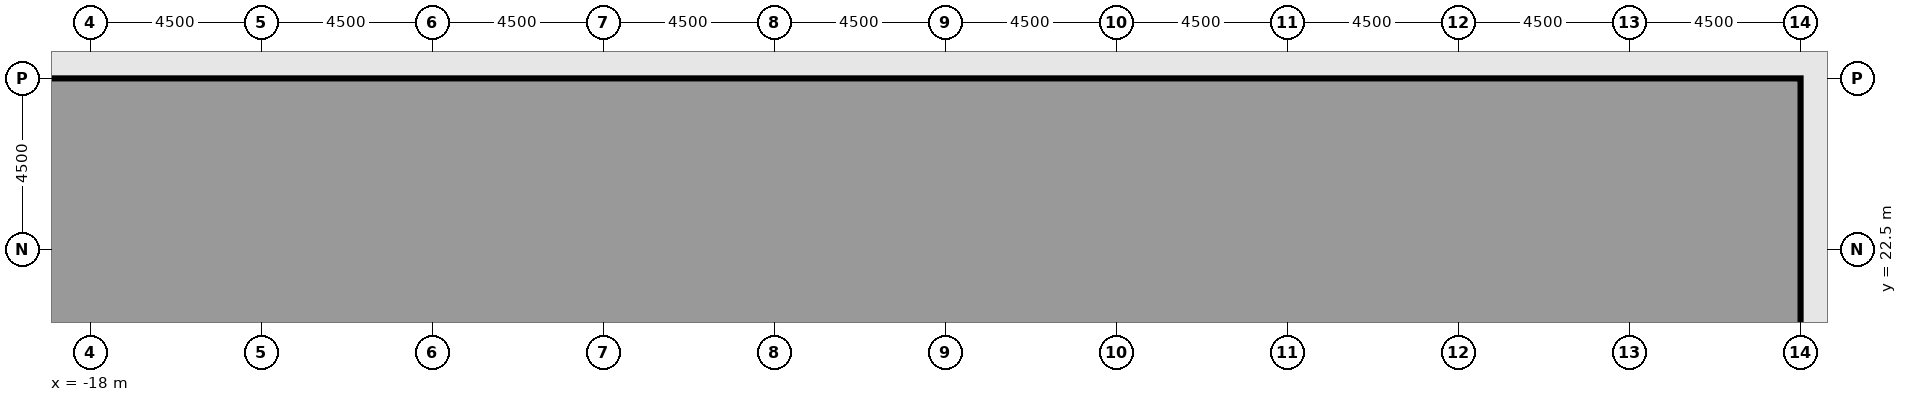
"""IFC4 building model, lengths in metres.
Left out: names, types, materials, properties, quantities, classifications, styles, units other than length and angle.
Written with IfcOpenShell. Run it as: python <this file> out.ifc"""

import sys

from ifc_helpers import new_model, si_unit, direction, frame, frame_2d, origin, origin_2d, place, context, subcontext, project, spatial, rectangle, extrude, element, fill, save


model = new_model("IFC4")
c1 = context("Model", 3, precision=1e-05, world=origin(), true_north=direction((0.0, 1.0)))
c2 = subcontext(c1, "Body", "Model", "MODEL_VIEW")
j1 = project(units=[si_unit("LENGTHUNIT", "METRE"), si_unit("PLANEANGLEUNIT", "RADIAN")], contexts=[c1])
p1 = place(None, origin())
s1 = spatial("IfcSite", under=j1, at=p1, CompositionType="ELEMENT")
p2 = place(p1, origin())
s2 = spatial("IfcBuilding", under=s1, at=p2, CompositionType="ELEMENT")
p3 = place(p2, frame((0.0, 0.0, 7.2)))
s3 = spatial("IfcBuildingStorey", under=s2, at=p3, CompositionType="ELEMENT", Elevation=7.2)
for number, where, z_axis, x_axis in (
    (1, (-18.0, 27.0, -0.45), (0.0, 0.0, 1.0), (1.0, 0.0, 0.0)),
    (2, (-13.5, 27.0, -0.45), (0.0, 0.0, 1.0), (1.0, 0.0, 0.0)),
    (3, (-9.0, 27.0, -0.45), (0.0, 0.0, 1.0), (1.0, 0.0, 0.0)),
    (4, (-4.5, 27.0, -0.45), (0.0, 0.0, 1.0), (1.0, 0.0, 0.0)),
    (5, (0.0, 27.0, -0.45), (0.0, 0.0, 1.0), (1.0, 0.0, 0.0)),
    (6, (4.5, 27.0, -0.45), (0.0, 0.0, 1.0), (1.0, 0.0, 0.0)),
    (7, (9.0, 27.0, -0.45), (0.0, 0.0, 1.0), (1.0, 0.0, 0.0)),
    (8, (13.5, 27.0, -0.45), (0.0, 0.0, 1.0), (1.0, 0.0, 0.0)),
    (9, (18.0, 27.0, -0.45), (0.0, 0.0, 1.0), (1.0, 0.0, 0.0)),
    (10, (22.5, 27.0, -0.45), (0.0, 0.0, 1.0), (1.0, 0.0, 0.0)),
    (11, (27.0, 22.5, -0.45), (0.0, 0.0, 1.0), (1.0, 0.0, 0.0)),
):
    element("IfcColumn", number, at=place(p3, frame(where, z_axis=z_axis, x_axis=x_axis)), inside=s3, PredefinedType="COLUMN", context=c2, shape_type="SweptSolid", body=[
        extrude(rectangle(XDim=1.4, YDim=1.4, at=origin_2d()), origin(), (0.0, 0.0, 1.0), 4.55),
    ])
for number, where, z_axis, x_axis in (
    (12, (-18.0, 22.5, 0.0), (0.0, 0.0, 1.0), (1.0, 0.0, 0.0)),
    (13, (-9.0, 22.5, 0.0), (0.0, 0.0, 1.0), (1.0, 0.0, 0.0)),
    (14, (0.0, 22.5, 0.0), (0.0, 0.0, 1.0), (1.0, 0.0, 0.0)),
    (15, (9.0, 22.5, 0.0), (0.0, 0.0, 1.0), (1.0, 0.0, 0.0)),
    (16, (18.0, 22.5, 0.0), (0.0, 0.0, 1.0), (1.0, 0.0, 0.0)),
):
    element("IfcColumn", number, at=place(p3, frame(where, z_axis=z_axis, x_axis=x_axis)), inside=s3, PredefinedType="COLUMN", context=c2, shape_type="SweptSolid", body=[
        extrude(rectangle(XDim=1.6, YDim=1.6, at=origin_2d()), origin(), (0.0, 0.0, 1.0), 4.1),
    ])
p4 = place(p3, frame((27.0, 21.8, 0.0), z_axis=(0.0, 0.0, 1.0), x_axis=(0.0, -1.0, 0.0)))
e17 = element("IfcWall", 17, at=p4, inside=s3, PredefinedType="SOLIDWALL", context=c2, shape_type="SweptSolid", body=[
    extrude(rectangle(XDim=3.1, YDim=0.3, at=frame_2d((1.55, 0.0))), origin(), (0.0, 0.0, 1.0), 2.75),
])
p5 = place(p4, frame((0.575, 0.0, 0.8)))
e18 = element("IfcOpeningElement", 18, at=p5, cuts=e17, PredefinedType="OPENING", context=c2, shape_type="SweptSolid", body=[
    extrude(rectangle(XDim=2.4, YDim=1.7, at=frame_2d((1.2, 0.85))), frame((0.0, 0.16, 0.0), z_axis=(0.0, -1.0, 0.0), x_axis=(1.0, 0.0, 0.0)), (0.0, 0.0, 1.0), 0.32),
])
p6 = place(p3, frame((23.094, 26.406, 0.0), z_axis=(0.0, 0.0, 1.0), x_axis=(0.707106781187, -0.707106781187, 0.0)))
e19 = element("IfcWall", 19, at=p6, inside=s3, PredefinedType="SOLIDWALL", context=c2, shape_type="SweptSolid", body=[
    extrude(rectangle(XDim=4.684, YDim=0.3, at=frame_2d((2.342, 0.0))), origin(), (0.0, 0.0, 1.0), 2.75),
])
p7 = place(p6, frame((1.142, 0.0, 0.8)))
e20 = element("IfcOpeningElement", 20, at=p7, cuts=e19, PredefinedType="OPENING", context=c2, shape_type="SweptSolid", body=[
    extrude(rectangle(XDim=2.4, YDim=1.7, at=frame_2d((1.2, 0.85))), frame((0.0, 0.16, 0.0), z_axis=(0.0, -1.0, 0.0), x_axis=(1.0, 0.0, 0.0)), (0.0, 0.0, 1.0), 0.32),
])
p8 = place(p3, frame((18.7, 27.0, 0.0), z_axis=(0.0, 0.0, 1.0), x_axis=(1.0, 0.0, 0.0)))
e21 = element("IfcWall", 21, at=p8, inside=s3, PredefinedType="SOLIDWALL", context=c2, shape_type="SweptSolid", body=[
    extrude(rectangle(XDim=3.1, YDim=0.3, at=frame_2d((1.55, 0.0))), origin(), (0.0, 0.0, 1.0), 2.75),
])
p9 = place(p8, frame((0.35, 0.0, 0.8)))
e22 = element("IfcOpeningElement", 22, at=p9, cuts=e21, PredefinedType="OPENING", context=c2, shape_type="SweptSolid", body=[
    extrude(rectangle(XDim=2.4, YDim=1.7, at=frame_2d((1.2, 0.85))), frame((0.0, 0.16, 0.0), z_axis=(0.0, -1.0, 0.0), x_axis=(1.0, 0.0, 0.0)), (0.0, 0.0, 1.0), 0.32),
])
p10 = place(p3, frame((14.2, 27.0, 0.0), z_axis=(0.0, 0.0, 1.0), x_axis=(1.0, 0.0, 0.0)))
e23 = element("IfcWall", 23, at=p10, inside=s3, PredefinedType="SOLIDWALL", context=c2, shape_type="SweptSolid", body=[
    extrude(rectangle(XDim=3.1, YDim=0.3, at=frame_2d((1.55, 0.0))), origin(), (0.0, 0.0, 1.0), 2.75),
])
p11 = place(p10, frame((1.05, 0.0, 0.0)))
e24 = element("IfcOpeningElement", 24, at=p11, cuts=e23, PredefinedType="OPENING", context=c2, shape_type="SweptSolid", body=[
    extrude(rectangle(XDim=1.0, YDim=2.2, at=frame_2d((0.5, 1.1))), frame((0.0, 0.16, 0.0), z_axis=(0.0, -1.0, 0.0), x_axis=(1.0, 0.0, 0.0)), (0.0, 0.0, 1.0), 0.32),
])
p12 = place(p3, frame((9.7, 27.0, 0.0), z_axis=(0.0, 0.0, 1.0), x_axis=(1.0, 0.0, 0.0)))
e25 = element("IfcWall", 25, at=p12, inside=s3, PredefinedType="SOLIDWALL", context=c2, shape_type="SweptSolid", body=[
    extrude(rectangle(XDim=3.1, YDim=0.3, at=frame_2d((1.55, 0.0))), origin(), (0.0, 0.0, 1.0), 2.75),
])
p13 = place(p12, frame((0.35, 0.0, 0.8)))
e26 = element("IfcOpeningElement", 26, at=p13, cuts=e25, PredefinedType="OPENING", context=c2, shape_type="SweptSolid", body=[
    extrude(rectangle(XDim=2.4, YDim=1.7, at=frame_2d((1.2, 0.85))), frame((0.0, 0.16, 0.0), z_axis=(0.0, -1.0, 0.0), x_axis=(1.0, 0.0, 0.0)), (0.0, 0.0, 1.0), 0.32),
])
p14 = place(p3, frame((5.2, 27.0, 0.0), z_axis=(0.0, 0.0, 1.0), x_axis=(1.0, 0.0, 0.0)))
e27 = element("IfcWall", 27, at=p14, inside=s3, PredefinedType="SOLIDWALL", context=c2, shape_type="SweptSolid", body=[
    extrude(rectangle(XDim=3.1, YDim=0.3, at=frame_2d((1.55, 0.0))), origin(), (0.0, 0.0, 1.0), 2.75),
])
p15 = place(p14, frame((0.35, 0.0, 0.8)))
e28 = element("IfcOpeningElement", 28, at=p15, cuts=e27, PredefinedType="OPENING", context=c2, shape_type="SweptSolid", body=[
    extrude(rectangle(XDim=2.4, YDim=1.7, at=frame_2d((1.2, 0.85))), frame((0.0, 0.16, 0.0), z_axis=(0.0, -1.0, 0.0), x_axis=(1.0, 0.0, 0.0)), (0.0, 0.0, 1.0), 0.32),
])
p16 = place(p3, frame((0.7, 27.0, 0.0), z_axis=(0.0, 0.0, 1.0), x_axis=(1.0, 0.0, 0.0)))
e29 = element("IfcWall", 29, at=p16, inside=s3, PredefinedType="SOLIDWALL", context=c2, shape_type="SweptSolid", body=[
    extrude(rectangle(XDim=3.1, YDim=0.3, at=frame_2d((1.55, 0.0))), origin(), (0.0, 0.0, 1.0), 2.75),
])
p17 = place(p16, frame((0.35, 0.0, 0.8)))
e30 = element("IfcOpeningElement", 30, at=p17, cuts=e29, PredefinedType="OPENING", context=c2, shape_type="SweptSolid", body=[
    extrude(rectangle(XDim=2.4, YDim=1.7, at=frame_2d((1.2, 0.85))), frame((0.0, 0.16, 0.0), z_axis=(0.0, -1.0, 0.0), x_axis=(1.0, 0.0, 0.0)), (0.0, 0.0, 1.0), 0.32),
])
p18 = place(p3, frame((-3.8, 27.0, 0.0), z_axis=(0.0, 0.0, 1.0), x_axis=(1.0, 0.0, 0.0)))
e31 = element("IfcWall", 31, at=p18, inside=s3, PredefinedType="SOLIDWALL", context=c2, shape_type="SweptSolid", body=[
    extrude(rectangle(XDim=3.1, YDim=0.3, at=frame_2d((1.55, 0.0))), origin(), (0.0, 0.0, 1.0), 2.75),
])
p19 = place(p18, frame((0.35, 0.0, 0.8)))
e32 = element("IfcOpeningElement", 32, at=p19, cuts=e31, PredefinedType="OPENING", context=c2, shape_type="SweptSolid", body=[
    extrude(rectangle(XDim=2.4, YDim=1.7, at=frame_2d((1.2, 0.85))), frame((0.0, 0.16, 0.0), z_axis=(0.0, -1.0, 0.0), x_axis=(1.0, 0.0, 0.0)), (0.0, 0.0, 1.0), 0.32),
])
p20 = place(p3, frame((-8.3, 27.0, 0.0), z_axis=(0.0, 0.0, 1.0), x_axis=(1.0, 0.0, 0.0)))
e33 = element("IfcWall", 33, at=p20, inside=s3, PredefinedType="SOLIDWALL", context=c2, shape_type="SweptSolid", body=[
    extrude(rectangle(XDim=3.1, YDim=0.3, at=frame_2d((1.55, 0.0))), origin(), (0.0, 0.0, 1.0), 2.75),
])
p21 = place(p20, frame((0.35, 0.0, 0.8)))
e34 = element("IfcOpeningElement", 34, at=p21, cuts=e33, PredefinedType="OPENING", context=c2, shape_type="SweptSolid", body=[
    extrude(rectangle(XDim=2.4, YDim=1.7, at=frame_2d((1.2, 0.85))), frame((0.0, 0.16, 0.0), z_axis=(0.0, -1.0, 0.0), x_axis=(1.0, 0.0, 0.0)), (0.0, 0.0, 1.0), 0.32),
])
p22 = place(p3, frame((-12.8, 27.0, 0.0), z_axis=(0.0, 0.0, 1.0), x_axis=(1.0, 0.0, 0.0)))
e35 = element("IfcWall", 35, at=p22, inside=s3, PredefinedType="SOLIDWALL", context=c2, shape_type="SweptSolid", body=[
    extrude(rectangle(XDim=3.1, YDim=0.3, at=frame_2d((1.55, 0.0))), origin(), (0.0, 0.0, 1.0), 2.75),
])
p23 = place(p22, frame((0.35, 0.0, 0.8)))
e36 = element("IfcOpeningElement", 36, at=p23, cuts=e35, PredefinedType="OPENING", context=c2, shape_type="SweptSolid", body=[
    extrude(rectangle(XDim=2.4, YDim=1.7, at=frame_2d((1.2, 0.85))), frame((0.0, 0.16, 0.0), z_axis=(0.0, -1.0, 0.0), x_axis=(1.0, 0.0, 0.0)), (0.0, 0.0, 1.0), 0.32),
])
p24 = place(p3, frame((-17.3, 27.0, 0.0), z_axis=(0.0, 0.0, 1.0), x_axis=(1.0, 0.0, 0.0)))
e37 = element("IfcWall", 37, at=p24, inside=s3, PredefinedType="SOLIDWALL", context=c2, shape_type="SweptSolid", body=[
    extrude(rectangle(XDim=3.1, YDim=0.3, at=frame_2d((1.55, 0.0))), origin(), (0.0, 0.0, 1.0), 2.75),
])
p25 = place(p24, frame((1.05, 0.0, 0.0)))
e38 = element("IfcOpeningElement", 38, at=p25, cuts=e37, PredefinedType="OPENING", context=c2, shape_type="SweptSolid", body=[
    extrude(rectangle(XDim=1.0, YDim=2.2, at=frame_2d((0.5, 1.1))), frame((0.0, 0.16, 0.0), z_axis=(0.0, -1.0, 0.0), x_axis=(1.0, 0.0, 0.0)), (0.0, 0.0, 1.0), 0.32),
])
p26 = place(p3, frame((-21.8, 27.0, 0.0), z_axis=(0.0, 0.0, 1.0), x_axis=(1.0, 0.0, 0.0)))
e39 = element("IfcWall", 39, at=p26, inside=s3, PredefinedType="SOLIDWALL", context=c2, shape_type="SweptSolid", body=[
    extrude(rectangle(XDim=3.1, YDim=0.3, at=frame_2d((1.55, 0.0))), origin(), (0.0, 0.0, 1.0), 2.75),
])
p27 = place(p26, frame((0.35, 0.0, 0.8)))
e40 = element("IfcOpeningElement", 40, at=p27, cuts=e39, PredefinedType="OPENING", context=c2, shape_type="SweptSolid", body=[
    extrude(rectangle(XDim=2.4, YDim=1.7, at=frame_2d((1.2, 0.85))), frame((0.0, 0.16, 0.0), z_axis=(0.0, -1.0, 0.0), x_axis=(1.0, 0.0, 0.0)), (0.0, 0.0, 1.0), 0.32),
])
p28 = place(p3, frame((-18.0, 23.3, 0.0), z_axis=(0.0, 0.0, 1.0), x_axis=(0.0, 1.0, 0.0)))
e41 = element("IfcWall", 41, at=p28, inside=s3, PredefinedType="PARTITIONING", context=c2, shape_type="SweptSolid", body=[
    extrude(rectangle(XDim=3.0, YDim=0.2, at=frame_2d((1.5, 0.0))), origin(), (0.0, 0.0, 1.0), 3.65),
])
for number, where, z_axis, x_axis in (
    (42, (-4.5, 21.5, 0.0), (0.0, 0.0, 1.0), (0.0, 1.0, 0.0)),
    (43, (4.5, 21.5, 0.0), (0.0, 0.0, 1.0), (0.0, 1.0, 0.0)),
    (44, (13.5, 21.5, 0.0), (0.0, 0.0, 1.0), (0.0, 1.0, 0.0)),
):
    element("IfcWall", number, at=place(p3, frame(where, z_axis=z_axis, x_axis=x_axis)), inside=s3, PredefinedType="PARTITIONING", context=c2, shape_type="SweptSolid", body=[
        extrude(rectangle(XDim=4.8, YDim=0.2, at=frame_2d((2.4, 0.0))), origin(), (0.0, 0.0, 1.0), 3.65),
    ])
p29 = place(p3, frame((18.0, 23.3, 0.0), z_axis=(0.0, 0.0, 1.0), x_axis=(0.0, 1.0, 0.0)))
e45 = element("IfcWall", 45, at=p29, inside=s3, PredefinedType="PARTITIONING", context=c2, shape_type="SweptSolid", body=[
    extrude(rectangle(XDim=3.0, YDim=0.2, at=frame_2d((1.5, 0.0))), origin(), (0.0, 0.0, 1.0), 3.65),
])
p30 = place(p3, frame((-26.85, 21.5, 0.0), z_axis=(0.0, 0.0, 1.0), x_axis=(1.0, 0.0, 0.0)))
e46 = element("IfcWall", 46, at=p30, inside=s3, PredefinedType="PARTITIONING", context=c2, shape_type="SweptSolid", body=[
    extrude(rectangle(XDim=53.7, YDim=0.2, at=frame_2d((26.85, 0.0))), origin(), (0.0, 0.0, 1.0), 3.65),
])
p31 = place(p30, frame((2.7, 0.0, 0.0)))
e47 = element("IfcOpeningElement", 47, at=p31, cuts=e46, PredefinedType="OPENING", context=c2, shape_type="SweptSolid", body=[
    extrude(rectangle(XDim=1.0, YDim=2.1, at=frame_2d((0.5, 1.05))), frame((0.0, 0.11, 0.0), z_axis=(0.0, -1.0, 0.0), x_axis=(1.0, 0.0, 0.0)), (0.0, 0.0, 1.0), 0.22),
])
p32 = place(p30, frame((12.95, 0.0, 0.0)))
e48 = element("IfcOpeningElement", 48, at=p32, cuts=e46, PredefinedType="OPENING", context=c2, shape_type="SweptSolid", body=[
    extrude(rectangle(XDim=1.0, YDim=2.1, at=frame_2d((0.5, 1.05))), frame((0.0, 0.11, 0.0), z_axis=(0.0, -1.0, 0.0), x_axis=(1.0, 0.0, 0.0)), (0.0, 0.0, 1.0), 0.22),
])
p33 = place(p30, frame((27.7, 0.0, 0.0)))
e49 = element("IfcOpeningElement", 49, at=p33, cuts=e46, PredefinedType="OPENING", context=c2, shape_type="SweptSolid", body=[
    extrude(rectangle(XDim=1.0, YDim=2.1, at=frame_2d((0.5, 1.05))), frame((0.0, 0.11, 0.0), z_axis=(0.0, -1.0, 0.0), x_axis=(1.0, 0.0, 0.0)), (0.0, 0.0, 1.0), 0.22),
])
p34 = place(p30, frame((33.95, 0.0, 0.0)))
e50 = element("IfcOpeningElement", 50, at=p34, cuts=e46, PredefinedType="OPENING", context=c2, shape_type="SweptSolid", body=[
    extrude(rectangle(XDim=1.0, YDim=2.1, at=frame_2d((0.5, 1.05))), frame((0.0, 0.11, 0.0), z_axis=(0.0, -1.0, 0.0), x_axis=(1.0, 0.0, 0.0)), (0.0, 0.0, 1.0), 0.22),
])
p35 = place(p30, frame((42.2, 0.0, 0.0)))
e51 = element("IfcOpeningElement", 51, at=p35, cuts=e46, PredefinedType="OPENING", context=c2, shape_type="SweptSolid", body=[
    extrude(rectangle(XDim=1.0, YDim=2.1, at=frame_2d((0.5, 1.05))), frame((0.0, 0.11, 0.0), z_axis=(0.0, -1.0, 0.0), x_axis=(1.0, 0.0, 0.0)), (0.0, 0.0, 1.0), 0.22),
])
p36 = place(p30, frame((47.45, 0.0, 0.0)))
e52 = element("IfcOpeningElement", 52, at=p36, cuts=e46, PredefinedType="OPENING", context=c2, shape_type="SweptSolid", body=[
    extrude(rectangle(XDim=1.0, YDim=2.1, at=frame_2d((0.5, 1.05))), frame((0.0, 0.11, 0.0), z_axis=(0.0, -1.0, 0.0), x_axis=(1.0, 0.0, 0.0)), (0.0, 0.0, 1.0), 0.22),
])
p37 = place(p5, origin())
e53 = element("IfcWindow", 53, at=p37, inside=s3, PartitioningType="SINGLE_PANEL", PredefinedType="WINDOW", context=c2, shape_type="SweptSolid", body=[
    extrude(rectangle(XDim=2.4, YDim=1.7, at=frame_2d((1.2, 0.85))), frame((0.0, 0.03, 0.0), z_axis=(0.0, -1.0, 0.0), x_axis=(1.0, 0.0, 0.0)), (0.0, 0.0, 1.0), 0.06),
])
fill(e18, e53)
p38 = place(p7, origin())
e54 = element("IfcWindow", 54, at=p38, inside=s3, PartitioningType="SINGLE_PANEL", PredefinedType="WINDOW", context=c2, shape_type="SweptSolid", body=[
    extrude(rectangle(XDim=2.4, YDim=1.7, at=frame_2d((1.2, 0.85))), frame((0.0, 0.03, 0.0), z_axis=(0.0, -1.0, 0.0), x_axis=(1.0, 0.0, 0.0)), (0.0, 0.0, 1.0), 0.06),
])
fill(e20, e54)
p39 = place(p9, origin())
e55 = element("IfcWindow", 55, at=p39, inside=s3, PartitioningType="SINGLE_PANEL", PredefinedType="WINDOW", context=c2, shape_type="SweptSolid", body=[
    extrude(rectangle(XDim=2.4, YDim=1.7, at=frame_2d((1.2, 0.85))), frame((0.0, 0.03, 0.0), z_axis=(0.0, -1.0, 0.0), x_axis=(1.0, 0.0, 0.0)), (0.0, 0.0, 1.0), 0.06),
])
fill(e22, e55)
p40 = place(p11, origin())
e56 = element("IfcDoor", 56, at=p40, inside=s3, OperationType="SINGLE_SWING_LEFT", PredefinedType="DOOR", context=c2, shape_type="SweptSolid", body=[
    extrude(rectangle(XDim=1.0, YDim=2.2, at=frame_2d((0.5, 1.1))), frame((0.0, 0.025, 0.0), z_axis=(0.0, -1.0, 0.0), x_axis=(1.0, 0.0, 0.0)), (0.0, 0.0, 1.0), 0.05),
])
fill(e24, e56)
p41 = place(p13, origin())
e57 = element("IfcWindow", 57, at=p41, inside=s3, PartitioningType="SINGLE_PANEL", PredefinedType="WINDOW", context=c2, shape_type="SweptSolid", body=[
    extrude(rectangle(XDim=2.4, YDim=1.7, at=frame_2d((1.2, 0.85))), frame((0.0, 0.03, 0.0), z_axis=(0.0, -1.0, 0.0), x_axis=(1.0, 0.0, 0.0)), (0.0, 0.0, 1.0), 0.06),
])
fill(e26, e57)
p42 = place(p15, origin())
e58 = element("IfcWindow", 58, at=p42, inside=s3, PartitioningType="SINGLE_PANEL", PredefinedType="WINDOW", context=c2, shape_type="SweptSolid", body=[
    extrude(rectangle(XDim=2.4, YDim=1.7, at=frame_2d((1.2, 0.85))), frame((0.0, 0.03, 0.0), z_axis=(0.0, -1.0, 0.0), x_axis=(1.0, 0.0, 0.0)), (0.0, 0.0, 1.0), 0.06),
])
fill(e28, e58)
p43 = place(p17, origin())
e59 = element("IfcWindow", 59, at=p43, inside=s3, PartitioningType="SINGLE_PANEL", PredefinedType="WINDOW", context=c2, shape_type="SweptSolid", body=[
    extrude(rectangle(XDim=2.4, YDim=1.7, at=frame_2d((1.2, 0.85))), frame((0.0, 0.03, 0.0), z_axis=(0.0, -1.0, 0.0), x_axis=(1.0, 0.0, 0.0)), (0.0, 0.0, 1.0), 0.06),
])
fill(e30, e59)
p44 = place(p19, origin())
e60 = element("IfcWindow", 60, at=p44, inside=s3, PartitioningType="SINGLE_PANEL", PredefinedType="WINDOW", context=c2, shape_type="SweptSolid", body=[
    extrude(rectangle(XDim=2.4, YDim=1.7, at=frame_2d((1.2, 0.85))), frame((0.0, 0.03, 0.0), z_axis=(0.0, -1.0, 0.0), x_axis=(1.0, 0.0, 0.0)), (0.0, 0.0, 1.0), 0.06),
])
fill(e32, e60)
p45 = place(p21, origin())
e61 = element("IfcWindow", 61, at=p45, inside=s3, PartitioningType="SINGLE_PANEL", PredefinedType="WINDOW", context=c2, shape_type="SweptSolid", body=[
    extrude(rectangle(XDim=2.4, YDim=1.7, at=frame_2d((1.2, 0.85))), frame((0.0, 0.03, 0.0), z_axis=(0.0, -1.0, 0.0), x_axis=(1.0, 0.0, 0.0)), (0.0, 0.0, 1.0), 0.06),
])
fill(e34, e61)
p46 = place(p23, origin())
e62 = element("IfcWindow", 62, at=p46, inside=s3, PartitioningType="SINGLE_PANEL", PredefinedType="WINDOW", context=c2, shape_type="SweptSolid", body=[
    extrude(rectangle(XDim=2.4, YDim=1.7, at=frame_2d((1.2, 0.85))), frame((0.0, 0.03, 0.0), z_axis=(0.0, -1.0, 0.0), x_axis=(1.0, 0.0, 0.0)), (0.0, 0.0, 1.0), 0.06),
])
fill(e36, e62)
p47 = place(p25, origin())
e63 = element("IfcDoor", 63, at=p47, inside=s3, OperationType="SINGLE_SWING_RIGHT", PredefinedType="DOOR", context=c2, shape_type="SweptSolid", body=[
    extrude(rectangle(XDim=1.0, YDim=2.2, at=frame_2d((0.5, 1.1))), frame((0.0, 0.025, 0.0), z_axis=(0.0, -1.0, 0.0), x_axis=(1.0, 0.0, 0.0)), (0.0, 0.0, 1.0), 0.05),
])
fill(e38, e63)
p48 = place(p32, origin())
e64 = element("IfcDoor", 64, at=p48, inside=s3, OperationType="SINGLE_SWING_LEFT", PredefinedType="DOOR", context=c2, shape_type="SweptSolid", body=[
    extrude(rectangle(XDim=1.0, YDim=2.1, at=frame_2d((0.5, 1.05))), frame((0.0, 0.025, 0.0), z_axis=(0.0, -1.0, 0.0), x_axis=(1.0, 0.0, 0.0)), (0.0, 0.0, 1.0), 0.05),
])
fill(e48, e64)
p49 = place(p33, origin())
e65 = element("IfcDoor", 65, at=p49, inside=s3, OperationType="SINGLE_SWING_RIGHT", PredefinedType="DOOR", context=c2, shape_type="SweptSolid", body=[
    extrude(rectangle(XDim=1.0, YDim=2.1, at=frame_2d((0.5, 1.05))), frame((0.0, 0.025, 0.0), z_axis=(0.0, -1.0, 0.0), x_axis=(1.0, 0.0, 0.0)), (0.0, 0.0, 1.0), 0.05),
])
fill(e49, e65)
p50 = place(p34, origin())
e66 = element("IfcDoor", 66, at=p50, inside=s3, OperationType="SINGLE_SWING_RIGHT", PredefinedType="DOOR", context=c2, shape_type="SweptSolid", body=[
    extrude(rectangle(XDim=1.0, YDim=2.1, at=frame_2d((0.5, 1.05))), frame((0.0, 0.025, 0.0), z_axis=(0.0, -1.0, 0.0), x_axis=(1.0, 0.0, 0.0)), (0.0, 0.0, 1.0), 0.05),
])
fill(e50, e66)
p51 = place(p35, origin())
e67 = element("IfcDoor", 67, at=p51, inside=s3, OperationType="SINGLE_SWING_RIGHT", PredefinedType="DOOR", context=c2, shape_type="SweptSolid", body=[
    extrude(rectangle(XDim=1.0, YDim=2.1, at=frame_2d((0.5, 1.05))), frame((0.0, 0.025, 0.0), z_axis=(0.0, -1.0, 0.0), x_axis=(1.0, 0.0, 0.0)), (0.0, 0.0, 1.0), 0.05),
])
fill(e51, e67)
p52 = place(p36, origin())
e68 = element("IfcDoor", 68, at=p52, inside=s3, OperationType="SINGLE_SWING_RIGHT", PredefinedType="DOOR", context=c2, shape_type="SweptSolid", body=[
    extrude(rectangle(XDim=1.0, YDim=2.1, at=frame_2d((0.5, 1.05))), frame((0.0, 0.025, 0.0), z_axis=(0.0, -1.0, 0.0), x_axis=(1.0, 0.0, 0.0)), (0.0, 0.0, 1.0), 0.05),
])
fill(e52, e68)
save(model, sys.argv[1])
